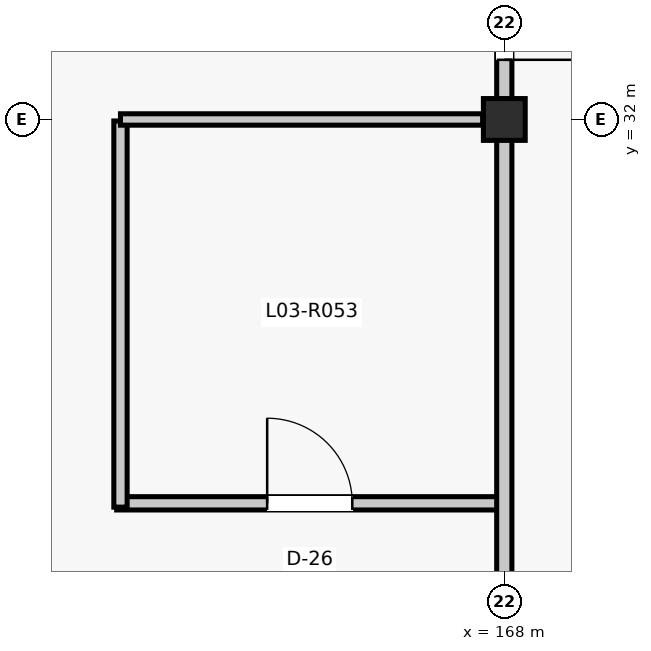
"""IFC4 building model, lengths in metres.
Left out: names, types, materials, properties, quantities, classifications, styles, units other than length and angle.
Written with IfcOpenShell. Run it as: python <this file> out.ifc"""

import sys

from ifc_helpers import new_model, si_unit, direction, frame, frame_2d, origin, origin_2d, place, context, subcontext, project, spatial, rectangle, extrude, element, fill, save


model = new_model("IFC4")
c1 = context("Model", 3, precision=1e-05, world=origin(), true_north=direction((0.0, 1.0)))
c2 = subcontext(c1, "Body", "Model", "MODEL_VIEW")
j1 = project(units=[si_unit("LENGTHUNIT", "METRE"), si_unit("PLANEANGLEUNIT", "RADIAN")], contexts=[c1])
p1 = place(None, origin())
s1 = spatial("IfcSite", under=j1, at=p1, CompositionType="ELEMENT")
p2 = place(p1, origin())
s2 = spatial("IfcBuilding", under=s1, at=p2, CompositionType="ELEMENT")
p3 = place(p2, frame((0.0, 0.0, 13.86)))
s3 = spatial("IfcBuildingStorey", under=s2, at=p3, CompositionType="ELEMENT", Elevation=13.86)
p4 = place(p3, frame((168.0, 32.0, 0.0), z_axis=(0.0, 0.0, 1.0), x_axis=(1.0, 0.0, 0.0)))
e1 = element("IfcColumn", 1, at=p4, inside=s3, PredefinedType="COLUMN", context=c2, shape_type="SweptSolid", body=[
    extrude(rectangle(XDim=0.55, YDim=0.55, at=origin_2d()), origin(), (0.0, 0.0, 1.0), 3.96),
])
p5 = place(p3, frame((162.9, 26.95, 0.0), z_axis=(0.0, 0.0, 1.0), x_axis=(1.0, 0.0, 0.0)))
e2 = element("IfcWall", 2, at=p5, inside=s3, PredefinedType="PARTITIONING", context=c2, shape_type="SweptSolid", body=[
    extrude(rectangle(XDim=5.08, YDim=0.175, at=frame_2d((2.54, 0.0))), origin(), (0.0, 0.0, 1.0), 3.242),
])
p6 = place(p5, frame((1.98, 0.0, 0.0)))
e3 = element("IfcOpeningElement", 3, at=p6, cuts=e2, PredefinedType="OPENING", context=c2, shape_type="SweptSolid", body=[
    extrude(rectangle(XDim=1.12, YDim=2.22, at=frame_2d((0.56, 1.11))), frame((0.0, 0.097, 0.0), z_axis=(0.0, -1.0, 0.0), x_axis=(1.0, 0.0, 0.0)), (0.0, 0.0, 1.0), 0.195),
])
p7 = place(p3, frame((162.95, 26.9, 0.0), z_axis=(0.0, 0.0, 1.0), x_axis=(0.0, 1.0, 0.0)))
e4 = element("IfcWall", 4, at=p7, inside=s3, PredefinedType="PARTITIONING", context=c2, shape_type="SweptSolid", body=[
    extrude(rectangle(XDim=5.08, YDim=0.175, at=frame_2d((2.54, 0.0))), origin(), (0.0, 0.0, 1.0), 3.242),
])
p8 = place(p3, frame((162.95, 32.0, 0.0), z_axis=(0.0, 0.0, 1.0), x_axis=(1.0, 0.0, 0.0)))
e5 = element("IfcWall", 5, at=p8, inside=s3, PredefinedType="PARTITIONING", context=c2, shape_type="SweptSolid", body=[
    extrude(rectangle(XDim=4.765, YDim=0.15, at=frame_2d((2.383, 0.0))), origin(), (0.0, 0.0, 1.0), 3.242),
])
p9 = place(p3, frame((168.0, 24.34, 0.0), z_axis=(0.0, 0.0, 1.0), x_axis=(0.0, 1.0, 0.0)))
e6 = element("IfcWall", 6, at=p9, inside=s3, PredefinedType="PARTITIONING", context=c2, shape_type="SweptSolid", body=[
    extrude(rectangle(XDim=7.395, YDim=0.2, at=frame_2d((3.698, 0.0))), origin(), (0.0, 0.0, 1.0), 3.242),
])
p10 = place(p9, frame((0.52, 0.0, 0.0)))
e7 = element("IfcOpeningElement", 7, at=p10, cuts=e6, PredefinedType="OPENING", context=c2, shape_type="SweptSolid", body=[
    extrude(rectangle(XDim=0.94, YDim=2.12, at=frame_2d((0.47, 1.06))), frame((0.0, 0.11, 0.0), z_axis=(0.0, -1.0, 0.0), x_axis=(1.0, 0.0, 0.0)), (0.0, 0.0, 1.0), 0.22),
])
p11 = place(p3, frame((168.0, 32.265, 0.0), z_axis=(0.0, 0.0, 1.0), x_axis=(0.0, 1.0, 0.0)))
e8 = element("IfcWall", 8, at=p11, inside=s3, PredefinedType="PARTITIONING", context=c2, shape_type="SweptSolid", body=[
    extrude(rectangle(XDim=7.47, YDim=0.2, at=frame_2d((3.735, 0.0))), origin(), (0.0, 0.0, 1.0), 3.258),
])
p12 = place(p11, frame((0.52, 0.0, 0.0)))
e9 = element("IfcOpeningElement", 9, at=p12, cuts=e8, PredefinedType="OPENING", context=c2, shape_type="SweptSolid", body=[
    extrude(rectangle(XDim=0.94, YDim=2.12, at=frame_2d((0.47, 1.06))), frame((0.0, 0.11, 0.0), z_axis=(0.0, -1.0, 0.0), x_axis=(1.0, 0.0, 0.0)), (0.0, 0.0, 1.0), 0.22),
])
p13 = place(p6, origin())
e10 = element("IfcDoor", 10, at=p13, inside=s3, OperationType="SINGLE_SWING_LEFT", PredefinedType="DOOR", context=c2, shape_type="SweptSolid", body=[
    extrude(rectangle(XDim=1.12, YDim=2.22, at=frame_2d((0.56, 1.11))), frame((0.0, 0.025, 0.0), z_axis=(0.0, -1.0, 0.0), x_axis=(1.0, 0.0, 0.0)), (0.0, 0.0, 1.0), 0.05),
])
fill(e3, e10)
p14 = place(p12, frame((0.94, 0.0, 0.0), z_axis=(0.0, 0.0, 1.0), x_axis=(-1.0, 0.0, 0.0)))
e11 = element("IfcDoor", 11, at=p14, inside=s3, OperationType="SINGLE_SWING_LEFT", PredefinedType="DOOR", context=c2, shape_type="SweptSolid", body=[
    extrude(rectangle(XDim=0.94, YDim=2.12, at=frame_2d((0.47, 1.06))), frame((0.0, 0.025, 0.0), z_axis=(0.0, -1.0, 0.0), x_axis=(1.0, 0.0, 0.0)), (0.0, 0.0, 1.0), 0.05),
])
fill(e9, e11)
save(model, sys.argv[1])
